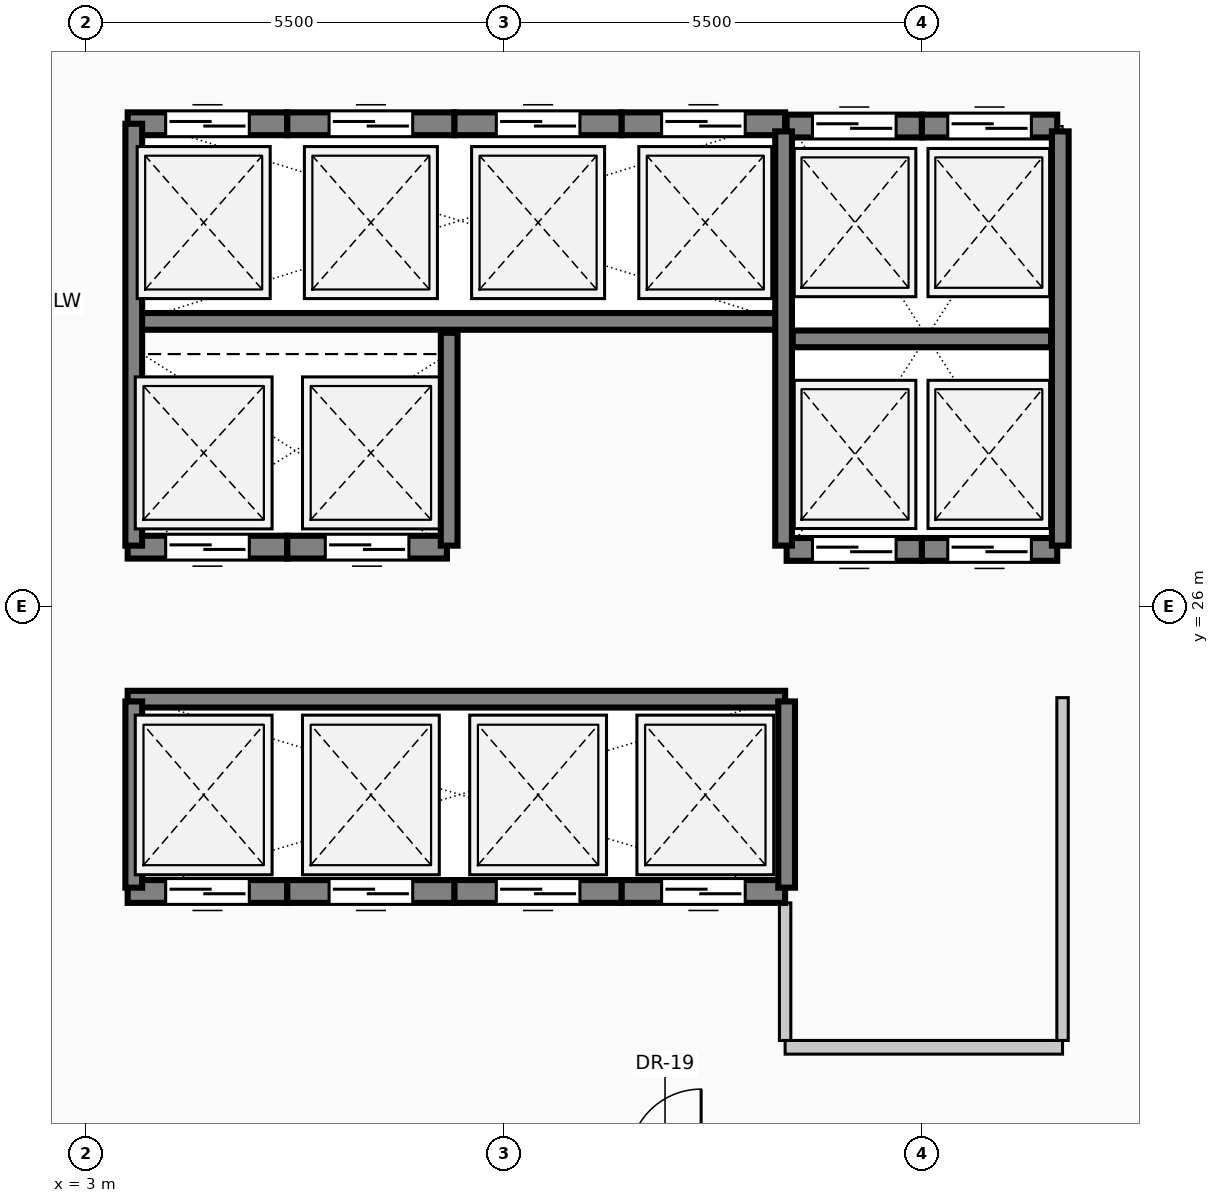
"""IFC4 building model, lengths in metres.
Left out: names, types, materials, properties, quantities, classifications, styles, units other than length and angle.
Written with IfcOpenShell. Run it as: python <this file> out.ifc"""

import sys

from ifc_helpers import new_model, si_unit, direction, frame, frame_2d, origin, place, context, subcontext, project, spatial, rectangle, extrude, element, fill, save


model = new_model("IFC4")
c1 = context("Model", 3, precision=1e-05, world=origin(), true_north=direction((0.0, 1.0)))
c2 = subcontext(c1, "Body", "Model", "MODEL_VIEW")
j1 = project(units=[si_unit("LENGTHUNIT", "METRE"), si_unit("PLANEANGLEUNIT", "RADIAN")], contexts=[c1])
p1 = place(None, origin())
s1 = spatial("IfcSite", under=j1, at=p1, CompositionType="ELEMENT")
p2 = place(p1, origin())
s2 = spatial("IfcBuilding", under=s1, at=p2, CompositionType="ELEMENT")
p3 = place(p2, frame((0.0, 0.0, 87.8)))
s3 = spatial("IfcBuildingStorey", under=s2, at=p3, CompositionType="ELEMENT", Elevation=87.8)
p4 = place(p3, frame((5.65, 22.25, 0.0), z_axis=(0.0, 0.0, 1.0), x_axis=(-1.0, 0.0, 0.0)))
e1 = element("IfcWall", 1, at=p4, inside=s3, PredefinedType="SOLIDWALL", context=c2, shape_type="SweptSolid", body=[
    extrude(rectangle(XDim=2.1, YDim=0.3, at=frame_2d((1.05, 0.0))), origin(), (0.0, 0.0, 1.0), 4.8),
])
p5 = place(p4, frame((0.5, 0.0, 0.0)))
e2 = element("IfcOpeningElement", 2, at=p5, cuts=e1, PredefinedType="OPENING", context=c2, shape_type="SweptSolid", body=[
    extrude(rectangle(XDim=1.1, YDim=2.2, at=frame_2d((0.55, 1.1))), frame((0.0, 0.16, 0.0), z_axis=(0.0, -1.0, 0.0), x_axis=(1.0, 0.0, 0.0)), (0.0, 0.0, 1.0), 0.32),
])
p6 = place(p3, frame((7.85, 22.25, 0.0), z_axis=(0.0, 0.0, 1.0), x_axis=(-1.0, 0.0, 0.0)))
e3 = element("IfcWall", 3, at=p6, inside=s3, PredefinedType="SOLIDWALL", context=c2, shape_type="SweptSolid", body=[
    extrude(rectangle(XDim=2.2, YDim=0.3, at=frame_2d((1.1, 0.0))), origin(), (0.0, 0.0, 1.0), 4.8),
])
p7 = place(p6, frame((0.55, 0.0, 0.0)))
e4 = element("IfcOpeningElement", 4, at=p7, cuts=e3, PredefinedType="OPENING", context=c2, shape_type="SweptSolid", body=[
    extrude(rectangle(XDim=1.1, YDim=2.2, at=frame_2d((0.55, 1.1))), frame((0.0, 0.16, 0.0), z_axis=(0.0, -1.0, 0.0), x_axis=(1.0, 0.0, 0.0)), (0.0, 0.0, 1.0), 0.32),
])
p8 = place(p3, frame((10.05, 22.25, 0.0), z_axis=(0.0, 0.0, 1.0), x_axis=(-1.0, 0.0, 0.0)))
e5 = element("IfcWall", 5, at=p8, inside=s3, PredefinedType="SOLIDWALL", context=c2, shape_type="SweptSolid", body=[
    extrude(rectangle(XDim=2.2, YDim=0.3, at=frame_2d((1.1, 0.0))), origin(), (0.0, 0.0, 1.0), 4.8),
])
p9 = place(p8, frame((0.55, 0.0, 0.0)))
e6 = element("IfcOpeningElement", 6, at=p9, cuts=e5, PredefinedType="OPENING", context=c2, shape_type="SweptSolid", body=[
    extrude(rectangle(XDim=1.1, YDim=2.2, at=frame_2d((0.55, 1.1))), frame((0.0, 0.16, 0.0), z_axis=(0.0, -1.0, 0.0), x_axis=(1.0, 0.0, 0.0)), (0.0, 0.0, 1.0), 0.32),
])
p10 = place(p3, frame((12.2, 22.25, 0.0), z_axis=(0.0, 0.0, 1.0), x_axis=(-1.0, 0.0, 0.0)))
e7 = element("IfcWall", 7, at=p10, inside=s3, PredefinedType="SOLIDWALL", context=c2, shape_type="SweptSolid", body=[
    extrude(rectangle(XDim=2.15, YDim=0.3, at=frame_2d((1.075, 0.0))), origin(), (0.0, 0.0, 1.0), 4.8),
])
p11 = place(p10, frame((0.525, 0.0, 0.0)))
e8 = element("IfcOpeningElement", 8, at=p11, cuts=e7, PredefinedType="OPENING", context=c2, shape_type="SweptSolid", body=[
    extrude(rectangle(XDim=1.1, YDim=2.2, at=frame_2d((0.55, 1.1))), frame((0.0, 0.16, 0.0), z_axis=(0.0, -1.0, 0.0), x_axis=(1.0, 0.0, 0.0)), (0.0, 0.0, 1.0), 0.32),
])
p12 = place(p3, frame((14.0, 26.75, 0.0), z_axis=(0.0, 0.0, 1.0), x_axis=(-1.0, 0.0, 0.0)))
e9 = element("IfcWall", 9, at=p12, inside=s3, PredefinedType="SOLIDWALL", context=c2, shape_type="SweptSolid", body=[
    extrude(rectangle(XDim=1.78, YDim=0.3, at=frame_2d((0.89, 0.0))), origin(), (0.0, 0.0, 1.0), 4.8),
])
p13 = place(p12, frame((0.34, 0.0, 0.0)))
e10 = element("IfcOpeningElement", 10, at=p13, cuts=e9, PredefinedType="OPENING", context=c2, shape_type="SweptSolid", body=[
    extrude(rectangle(XDim=1.1, YDim=2.2, at=frame_2d((0.55, 1.1))), frame((0.0, 0.16, 0.0), z_axis=(0.0, -1.0, 0.0), x_axis=(1.0, 0.0, 0.0)), (0.0, 0.0, 1.0), 0.32),
])
p14 = place(p3, frame((15.78, 26.75, 0.0), z_axis=(0.0, 0.0, 1.0), x_axis=(-1.0, 0.0, 0.0)))
e11 = element("IfcWall", 11, at=p14, inside=s3, PredefinedType="SOLIDWALL", context=c2, shape_type="SweptSolid", body=[
    extrude(rectangle(XDim=1.78, YDim=0.3, at=frame_2d((0.89, 0.0))), origin(), (0.0, 0.0, 1.0), 4.8),
])
p15 = place(p14, frame((0.34, 0.0, 0.0)))
e12 = element("IfcOpeningElement", 12, at=p15, cuts=e11, PredefinedType="OPENING", context=c2, shape_type="SweptSolid", body=[
    extrude(rectangle(XDim=1.1, YDim=2.2, at=frame_2d((0.55, 1.1))), frame((0.0, 0.16, 0.0), z_axis=(0.0, -1.0, 0.0), x_axis=(1.0, 0.0, 0.0)), (0.0, 0.0, 1.0), 0.32),
])
p16 = place(p3, frame((12.22, 32.32, 0.0), z_axis=(0.0, 0.0, 1.0), x_axis=(1.0, 0.0, 0.0)))
e13 = element("IfcWall", 13, at=p16, inside=s3, PredefinedType="SOLIDWALL", context=c2, shape_type="SweptSolid", body=[
    extrude(rectangle(XDim=1.78, YDim=0.3, at=frame_2d((0.89, 0.0))), origin(), (0.0, 0.0, 1.0), 4.8),
])
p17 = place(p16, frame((0.34, 0.0, 0.0)))
e14 = element("IfcOpeningElement", 14, at=p17, cuts=e13, PredefinedType="OPENING", context=c2, shape_type="SweptSolid", body=[
    extrude(rectangle(XDim=1.1, YDim=2.2, at=frame_2d((0.55, 1.1))), frame((0.0, 0.16, 0.0), z_axis=(0.0, -1.0, 0.0), x_axis=(1.0, 0.0, 0.0)), (0.0, 0.0, 1.0), 0.32),
])
p18 = place(p3, frame((14.0, 32.32, 0.0), z_axis=(0.0, 0.0, 1.0), x_axis=(1.0, 0.0, 0.0)))
e15 = element("IfcWall", 15, at=p18, inside=s3, PredefinedType="SOLIDWALL", context=c2, shape_type="SweptSolid", body=[
    extrude(rectangle(XDim=1.78, YDim=0.3, at=frame_2d((0.89, 0.0))), origin(), (0.0, 0.0, 1.0), 4.8),
])
p19 = place(p18, frame((0.34, 0.0, 0.0)))
e16 = element("IfcOpeningElement", 16, at=p19, cuts=e15, PredefinedType="OPENING", context=c2, shape_type="SweptSolid", body=[
    extrude(rectangle(XDim=1.1, YDim=2.2, at=frame_2d((0.55, 1.1))), frame((0.0, 0.16, 0.0), z_axis=(0.0, -1.0, 0.0), x_axis=(1.0, 0.0, 0.0)), (0.0, 0.0, 1.0), 0.32),
])
p20 = place(p3, frame((3.55, 32.35, 0.0), z_axis=(0.0, 0.0, 1.0), x_axis=(1.0, 0.0, 0.0)))
e17 = element("IfcWall", 17, at=p20, inside=s3, PredefinedType="SOLIDWALL", context=c2, shape_type="SweptSolid", body=[
    extrude(rectangle(XDim=2.1, YDim=0.3, at=frame_2d((1.05, 0.0))), origin(), (0.0, 0.0, 1.0), 4.8),
])
p21 = place(p20, frame((0.5, 0.0, 0.0)))
e18 = element("IfcOpeningElement", 18, at=p21, cuts=e17, PredefinedType="OPENING", context=c2, shape_type="SweptSolid", body=[
    extrude(rectangle(XDim=1.1, YDim=2.2, at=frame_2d((0.55, 1.1))), frame((0.0, 0.16, 0.0), z_axis=(0.0, -1.0, 0.0), x_axis=(1.0, 0.0, 0.0)), (0.0, 0.0, 1.0), 0.32),
])
p22 = place(p3, frame((5.65, 32.35, 0.0), z_axis=(0.0, 0.0, 1.0), x_axis=(1.0, 0.0, 0.0)))
e19 = element("IfcWall", 19, at=p22, inside=s3, PredefinedType="SOLIDWALL", context=c2, shape_type="SweptSolid", body=[
    extrude(rectangle(XDim=2.2, YDim=0.3, at=frame_2d((1.1, 0.0))), origin(), (0.0, 0.0, 1.0), 4.8),
])
p23 = place(p22, frame((0.55, 0.0, 0.0)))
e20 = element("IfcOpeningElement", 20, at=p23, cuts=e19, PredefinedType="OPENING", context=c2, shape_type="SweptSolid", body=[
    extrude(rectangle(XDim=1.1, YDim=2.2, at=frame_2d((0.55, 1.1))), frame((0.0, 0.16, 0.0), z_axis=(0.0, -1.0, 0.0), x_axis=(1.0, 0.0, 0.0)), (0.0, 0.0, 1.0), 0.32),
])
p24 = place(p3, frame((7.85, 32.35, 0.0), z_axis=(0.0, 0.0, 1.0), x_axis=(1.0, 0.0, 0.0)))
e21 = element("IfcWall", 21, at=p24, inside=s3, PredefinedType="SOLIDWALL", context=c2, shape_type="SweptSolid", body=[
    extrude(rectangle(XDim=2.2, YDim=0.3, at=frame_2d((1.1, 0.0))), origin(), (0.0, 0.0, 1.0), 4.8),
])
p25 = place(p24, frame((0.55, 0.0, 0.0)))
e22 = element("IfcOpeningElement", 22, at=p25, cuts=e21, PredefinedType="OPENING", context=c2, shape_type="SweptSolid", body=[
    extrude(rectangle(XDim=1.1, YDim=2.2, at=frame_2d((0.55, 1.1))), frame((0.0, 0.16, 0.0), z_axis=(0.0, -1.0, 0.0), x_axis=(1.0, 0.0, 0.0)), (0.0, 0.0, 1.0), 0.32),
])
p26 = place(p3, frame((10.05, 32.35, 0.0), z_axis=(0.0, 0.0, 1.0), x_axis=(1.0, 0.0, 0.0)))
e23 = element("IfcWall", 23, at=p26, inside=s3, PredefinedType="SOLIDWALL", context=c2, shape_type="SweptSolid", body=[
    extrude(rectangle(XDim=2.15, YDim=0.3, at=frame_2d((1.075, 0.0))), origin(), (0.0, 0.0, 1.0), 4.8),
])
p27 = place(p26, frame((0.525, 0.0, 0.0)))
e24 = element("IfcOpeningElement", 24, at=p27, cuts=e23, PredefinedType="OPENING", context=c2, shape_type="SweptSolid", body=[
    extrude(rectangle(XDim=1.1, YDim=2.2, at=frame_2d((0.55, 1.1))), frame((0.0, 0.16, 0.0), z_axis=(0.0, -1.0, 0.0), x_axis=(1.0, 0.0, 0.0)), (0.0, 0.0, 1.0), 0.32),
])
p28 = place(p3, frame((5.65, 26.78, 0.0), z_axis=(0.0, 0.0, 1.0), x_axis=(-1.0, 0.0, 0.0)))
e25 = element("IfcWall", 25, at=p28, inside=s3, PredefinedType="SOLIDWALL", context=c2, shape_type="SweptSolid", body=[
    extrude(rectangle(XDim=2.1, YDim=0.3, at=frame_2d((1.05, 0.0))), origin(), (0.0, 0.0, 1.0), 4.8),
])
p29 = place(p28, frame((0.5, 0.0, 0.0)))
e26 = element("IfcOpeningElement", 26, at=p29, cuts=e25, PredefinedType="OPENING", context=c2, shape_type="SweptSolid", body=[
    extrude(rectangle(XDim=1.1, YDim=2.2, at=frame_2d((0.55, 1.1))), frame((0.0, 0.16, 0.0), z_axis=(0.0, -1.0, 0.0), x_axis=(1.0, 0.0, 0.0)), (0.0, 0.0, 1.0), 0.32),
])
p30 = place(p3, frame((7.75, 26.78, 0.0), z_axis=(0.0, 0.0, 1.0), x_axis=(-1.0, 0.0, 0.0)))
e27 = element("IfcWall", 27, at=p30, inside=s3, PredefinedType="SOLIDWALL", context=c2, shape_type="SweptSolid", body=[
    extrude(rectangle(XDim=2.1, YDim=0.3, at=frame_2d((1.05, 0.0))), origin(), (0.0, 0.0, 1.0), 4.8),
])
p31 = place(p30, frame((0.5, 0.0, 0.0)))
e28 = element("IfcOpeningElement", 28, at=p31, cuts=e27, PredefinedType="OPENING", context=c2, shape_type="SweptSolid", body=[
    extrude(rectangle(XDim=1.1, YDim=2.2, at=frame_2d((0.55, 1.1))), frame((0.0, 0.16, 0.0), z_axis=(0.0, -1.0, 0.0), x_axis=(1.0, 0.0, 0.0)), (0.0, 0.0, 1.0), 0.32),
])
p32 = place(p3, frame((3.55, 29.75, 0.0), z_axis=(0.0, 0.0, 1.0), x_axis=(1.0, 0.0, 0.0)))
e29 = element("IfcWall", 29, at=p32, inside=s3, PredefinedType="SOLIDWALL", context=c2, shape_type="SweptSolid", body=[
    extrude(rectangle(XDim=8.65, YDim=0.22, at=frame_2d((4.325, 0.0))), origin(), (0.0, 0.0, 1.0), 4.8),
])
p33 = place(p3, frame((3.63, 26.8, 0.0), z_axis=(0.0, 0.0, 1.0), x_axis=(0.0, 1.0, 0.0)))
e30 = element("IfcWall", 30, at=p33, inside=s3, PredefinedType="SOLIDWALL", context=c2, shape_type="SweptSolid", body=[
    extrude(rectangle(XDim=5.55, YDim=0.22, at=frame_2d((2.775, 0.0))), origin(), (0.0, 0.0, 1.0), 4.8),
])
p34 = place(p3, frame((7.78, 26.8, 0.0), z_axis=(0.0, 0.0, 1.0), x_axis=(0.0, 1.0, 0.0)))
e31 = element("IfcWall", 31, at=p34, inside=s3, PredefinedType="SOLIDWALL", context=c2, shape_type="SweptSolid", body=[
    extrude(rectangle(XDim=2.8, YDim=0.22, at=frame_2d((1.4, 0.0))), origin(), (0.0, 0.0, 1.0), 4.8),
])
for number, where, z_axis, x_axis in (
    (32, (12.18, 26.8, 0.0), (0.0, 0.0, 1.0), (0.0, 1.0, 0.0)),
    (33, (15.82, 26.8, 0.0), (0.0, 0.0, 1.0), (0.0, 1.0, 0.0)),
):
    element("IfcWall", number, at=place(p3, frame(where, z_axis=z_axis, x_axis=x_axis)), inside=s3, PredefinedType="SOLIDWALL", context=c2, shape_type="SweptSolid", body=[
        extrude(rectangle(XDim=5.45, YDim=0.22, at=frame_2d((2.725, 0.0))), origin(), (0.0, 0.0, 1.0), 4.8),
    ])
p35 = place(p3, frame((12.3, 29.52, 0.0), z_axis=(0.0, 0.0, 1.0), x_axis=(1.0, 0.0, 0.0)))
e34 = element("IfcWall", 34, at=p35, inside=s3, PredefinedType="SOLIDWALL", context=c2, shape_type="SweptSolid", body=[
    extrude(rectangle(XDim=3.4, YDim=0.22, at=frame_2d((1.7, 0.0))), origin(), (0.0, 0.0, 1.0), 4.8),
])
p36 = place(p3, frame((3.55, 24.78, 0.0), z_axis=(0.0, 0.0, 1.0), x_axis=(1.0, 0.0, 0.0)))
e35 = element("IfcWall", 35, at=p36, inside=s3, PredefinedType="SOLIDWALL", context=c2, shape_type="SweptSolid", body=[
    extrude(rectangle(XDim=8.65, YDim=0.22, at=frame_2d((4.325, 0.0))), origin(), (0.0, 0.0, 1.0), 4.8),
])
for number, where, z_axis, x_axis in (
    (36, (3.63, 22.3, 0.0), (0.0, 0.0, 1.0), (0.0, 1.0, 0.0)),
    (37, (12.22, 22.3, 0.0), (0.0, 0.0, 1.0), (0.0, 1.0, 0.0)),
):
    element("IfcWall", number, at=place(p3, frame(where, z_axis=z_axis, x_axis=x_axis)), inside=s3, PredefinedType="SOLIDWALL", context=c2, shape_type="SweptSolid", body=[
        extrude(rectangle(XDim=2.45, YDim=0.22, at=frame_2d((1.225, 0.0))), origin(), (0.0, 0.0, 1.0), 4.8),
    ])
p37 = place(p3, frame((12.2, 20.2, 0.0), z_axis=(0.0, 0.0, 1.0), x_axis=(1.0, 0.0, 0.0)))
e38 = element("IfcWall", 38, at=p37, inside=s3, PredefinedType="PARTITIONING", context=c2, shape_type="SweptSolid", body=[
    extrude(rectangle(XDim=3.65, YDim=0.18, at=frame_2d((1.825, 0.0))), origin(), (0.0, 0.0, 1.0), 4.525),
])
p38 = place(p3, frame((12.2, 20.29, 0.0), z_axis=(0.0, 0.0, 1.0), x_axis=(0.0, 1.0, 0.0)))
e39 = element("IfcWall", 39, at=p38, inside=s3, PredefinedType="PARTITIONING", context=c2, shape_type="SweptSolid", body=[
    extrude(rectangle(XDim=1.81, YDim=0.15, at=frame_2d((0.905, 0.0))), origin(), (0.0, 0.0, 1.0), 4.525),
])
p39 = place(p3, frame((15.85, 20.29, 0.0), z_axis=(0.0, 0.0, 1.0), x_axis=(0.0, 1.0, 0.0)))
e40 = element("IfcWall", 40, at=p39, inside=s3, PredefinedType="PARTITIONING", context=c2, shape_type="SweptSolid", body=[
    extrude(rectangle(XDim=4.51, YDim=0.15, at=frame_2d((2.255, 0.0))), origin(), (0.0, 0.0, 1.0), 4.525),
])
p40 = place(p5, origin())
e41 = element("IfcDoor", 41, at=p40, inside=s3, OperationType="SLIDING_TO_LEFT", PredefinedType="DOOR", context=c2, shape_type="SweptSolid", body=[
    extrude(rectangle(XDim=1.1, YDim=2.2, at=frame_2d((0.55, 1.1))), frame((0.0, 0.025, 0.0), z_axis=(0.0, -1.0, 0.0), x_axis=(1.0, 0.0, 0.0)), (0.0, 0.0, 1.0), 0.05),
])
fill(e2, e41)
p41 = place(p7, origin())
e42 = element("IfcDoor", 42, at=p41, inside=s3, OperationType="SLIDING_TO_RIGHT", PredefinedType="DOOR", context=c2, shape_type="SweptSolid", body=[
    extrude(rectangle(XDim=1.1, YDim=2.2, at=frame_2d((0.55, 1.1))), frame((0.0, 0.025, 0.0), z_axis=(0.0, -1.0, 0.0), x_axis=(1.0, 0.0, 0.0)), (0.0, 0.0, 1.0), 0.05),
])
fill(e4, e42)
p42 = place(p9, origin())
e43 = element("IfcDoor", 43, at=p42, inside=s3, OperationType="SLIDING_TO_LEFT", PredefinedType="DOOR", context=c2, shape_type="SweptSolid", body=[
    extrude(rectangle(XDim=1.1, YDim=2.2, at=frame_2d((0.55, 1.1))), frame((0.0, 0.025, 0.0), z_axis=(0.0, -1.0, 0.0), x_axis=(1.0, 0.0, 0.0)), (0.0, 0.0, 1.0), 0.05),
])
fill(e6, e43)
p43 = place(p11, origin())
e44 = element("IfcDoor", 44, at=p43, inside=s3, OperationType="SLIDING_TO_RIGHT", PredefinedType="DOOR", context=c2, shape_type="SweptSolid", body=[
    extrude(rectangle(XDim=1.1, YDim=2.2, at=frame_2d((0.55, 1.1))), frame((0.0, 0.025, 0.0), z_axis=(0.0, -1.0, 0.0), x_axis=(1.0, 0.0, 0.0)), (0.0, 0.0, 1.0), 0.05),
])
fill(e8, e44)
p44 = place(p13, origin())
e45 = element("IfcDoor", 45, at=p44, inside=s3, OperationType="SLIDING_TO_LEFT", PredefinedType="DOOR", context=c2, shape_type="SweptSolid", body=[
    extrude(rectangle(XDim=1.1, YDim=2.2, at=frame_2d((0.55, 1.1))), frame((0.0, 0.025, 0.0), z_axis=(0.0, -1.0, 0.0), x_axis=(1.0, 0.0, 0.0)), (0.0, 0.0, 1.0), 0.05),
])
fill(e10, e45)
p45 = place(p15, origin())
e46 = element("IfcDoor", 46, at=p45, inside=s3, OperationType="SLIDING_TO_RIGHT", PredefinedType="DOOR", context=c2, shape_type="SweptSolid", body=[
    extrude(rectangle(XDim=1.1, YDim=2.2, at=frame_2d((0.55, 1.1))), frame((0.0, 0.025, 0.0), z_axis=(0.0, -1.0, 0.0), x_axis=(1.0, 0.0, 0.0)), (0.0, 0.0, 1.0), 0.05),
])
fill(e12, e46)
p46 = place(p17, origin())
e47 = element("IfcDoor", 47, at=p46, inside=s3, OperationType="SLIDING_TO_LEFT", PredefinedType="DOOR", context=c2, shape_type="SweptSolid", body=[
    extrude(rectangle(XDim=1.1, YDim=2.2, at=frame_2d((0.55, 1.1))), frame((0.0, 0.025, 0.0), z_axis=(0.0, -1.0, 0.0), x_axis=(1.0, 0.0, 0.0)), (0.0, 0.0, 1.0), 0.05),
])
fill(e14, e47)
p47 = place(p19, origin())
e48 = element("IfcDoor", 48, at=p47, inside=s3, OperationType="SLIDING_TO_RIGHT", PredefinedType="DOOR", context=c2, shape_type="SweptSolid", body=[
    extrude(rectangle(XDim=1.1, YDim=2.2, at=frame_2d((0.55, 1.1))), frame((0.0, 0.025, 0.0), z_axis=(0.0, -1.0, 0.0), x_axis=(1.0, 0.0, 0.0)), (0.0, 0.0, 1.0), 0.05),
])
fill(e16, e48)
p48 = place(p21, origin())
e49 = element("IfcDoor", 49, at=p48, inside=s3, OperationType="SLIDING_TO_LEFT", PredefinedType="DOOR", context=c2, shape_type="SweptSolid", body=[
    extrude(rectangle(XDim=1.1, YDim=2.2, at=frame_2d((0.55, 1.1))), frame((0.0, 0.025, 0.0), z_axis=(0.0, -1.0, 0.0), x_axis=(1.0, 0.0, 0.0)), (0.0, 0.0, 1.0), 0.05),
])
fill(e18, e49)
p49 = place(p23, origin())
e50 = element("IfcDoor", 50, at=p49, inside=s3, OperationType="SLIDING_TO_RIGHT", PredefinedType="DOOR", context=c2, shape_type="SweptSolid", body=[
    extrude(rectangle(XDim=1.1, YDim=2.2, at=frame_2d((0.55, 1.1))), frame((0.0, 0.025, 0.0), z_axis=(0.0, -1.0, 0.0), x_axis=(1.0, 0.0, 0.0)), (0.0, 0.0, 1.0), 0.05),
])
fill(e20, e50)
p50 = place(p25, origin())
e51 = element("IfcDoor", 51, at=p50, inside=s3, OperationType="SLIDING_TO_LEFT", PredefinedType="DOOR", context=c2, shape_type="SweptSolid", body=[
    extrude(rectangle(XDim=1.1, YDim=2.2, at=frame_2d((0.55, 1.1))), frame((0.0, 0.025, 0.0), z_axis=(0.0, -1.0, 0.0), x_axis=(1.0, 0.0, 0.0)), (0.0, 0.0, 1.0), 0.05),
])
fill(e22, e51)
p51 = place(p27, origin())
e52 = element("IfcDoor", 52, at=p51, inside=s3, OperationType="SLIDING_TO_RIGHT", PredefinedType="DOOR", context=c2, shape_type="SweptSolid", body=[
    extrude(rectangle(XDim=1.1, YDim=2.2, at=frame_2d((0.55, 1.1))), frame((0.0, 0.025, 0.0), z_axis=(0.0, -1.0, 0.0), x_axis=(1.0, 0.0, 0.0)), (0.0, 0.0, 1.0), 0.05),
])
fill(e24, e52)
p52 = place(p29, origin())
e53 = element("IfcDoor", 53, at=p52, inside=s3, OperationType="SLIDING_TO_LEFT", PredefinedType="DOOR", context=c2, shape_type="SweptSolid", body=[
    extrude(rectangle(XDim=1.1, YDim=2.2, at=frame_2d((0.55, 1.1))), frame((0.0, 0.025, 0.0), z_axis=(0.0, -1.0, 0.0), x_axis=(1.0, 0.0, 0.0)), (0.0, 0.0, 1.0), 0.05),
])
fill(e26, e53)
p53 = place(p31, origin())
e54 = element("IfcDoor", 54, at=p53, inside=s3, OperationType="SLIDING_TO_RIGHT", PredefinedType="DOOR", context=c2, shape_type="SweptSolid", body=[
    extrude(rectangle(XDim=1.1, YDim=2.2, at=frame_2d((0.55, 1.1))), frame((0.0, 0.025, 0.0), z_axis=(0.0, -1.0, 0.0), x_axis=(1.0, 0.0, 0.0)), (0.0, 0.0, 1.0), 0.05),
])
fill(e28, e54)
save(model, sys.argv[1])
